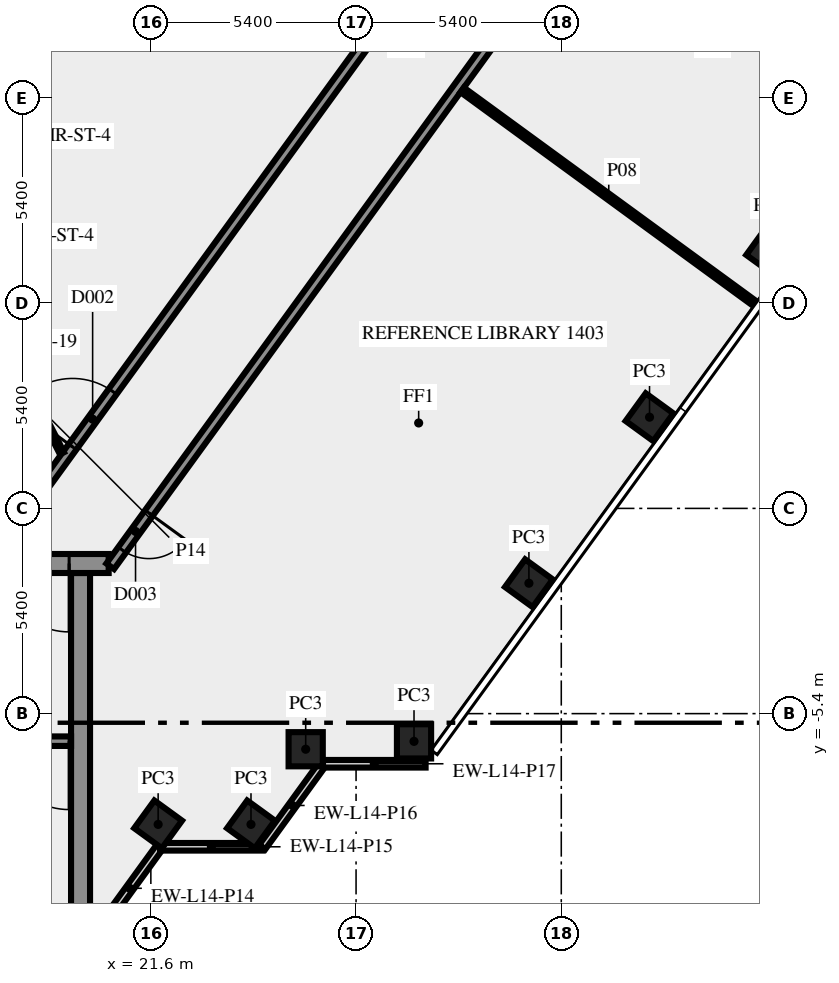
"""IFC4 building model, lengths in metres.
Left out: names, types, materials, properties, quantities, classifications, styles, units other than length and angle.
Written with IfcOpenShell. Run it as: python <this file> out.ifc"""

import sys

from ifc_helpers import new_model, si_unit, direction, frame, frame_2d, origin, origin_2d, place, context, subcontext, project, spatial, rectangle, extrude, element, fill, save


model = new_model("IFC4")
c1 = context("Model", 3, precision=1e-05, world=origin(), true_north=direction((0.0, 1.0)))
c2 = subcontext(c1, "Body", "Model", "MODEL_VIEW")
j1 = project(units=[si_unit("LENGTHUNIT", "METRE"), si_unit("PLANEANGLEUNIT", "RADIAN")], contexts=[c1])
p1 = place(None, origin())
s1 = spatial("IfcSite", under=j1, at=p1, CompositionType="ELEMENT")
p2 = place(p1, origin())
s2 = spatial("IfcBuilding", under=s1, at=p2, CompositionType="ELEMENT")
p3 = place(p2, frame((0.0, 0.0, 63.0)))
s3 = spatial("IfcBuildingStorey", under=s2, at=p3, CompositionType="ELEMENT", Elevation=63.0)
for number, where, z_axis, x_axis in (
    (1, (21.792, -8.315, 0.0), (0.0, 0.0, 1.0), (0.588, 0.809, 0.0)),
    (2, (24.235, -8.315, 0.0), (0.0, 0.0, 1.0), (0.588, 0.809, 0.0)),
    (3, (25.674, -6.337, 0.0), (0.0, 0.0, 1.0), (1.0, 0.0, 0.0)),
    (4, (28.525, -6.13, 0.0), (0.0, 0.0, 1.0), (1.0, 0.0, 0.0)),
    (5, (31.548, -1.969, 0.0), (0.0, 0.0, 1.0), (0.588, 0.809, 0.0)),
    (6, (34.722, 2.4, 0.0), (0.0, 0.0, 1.0), (0.588, 0.809, 0.0)),
    (7, (37.896, 6.769, 0.0), (0.0, 0.0, 1.0), (0.588, 0.809, 0.0)),
):
    element("IfcColumn", number, at=place(p3, frame(where, z_axis=z_axis, x_axis=x_axis)), inside=s3, PredefinedType="COLUMN", context=c2, shape_type="SweptSolid", body=[
        extrude(rectangle(XDim=0.9, YDim=0.9, at=origin_2d()), origin(), (0.0, 0.0, 1.0), 3.65),
    ])
p4 = place(p3, frame((20.253, -11.083, 0.0), z_axis=(0.0, 0.0, 1.0), x_axis=(0.587766567315, 0.809030569476, 0.0)))
e8 = element("IfcWall", 8, at=p4, inside=s3, PredefinedType="SOLIDWALL", context=c2, shape_type="SweptSolid", body=[
    extrude(rectangle(XDim=2.688, YDim=0.2, at=frame_2d((1.344, 0.0))), origin(), (0.0, 0.0, 1.0), 3.65),
])
p5 = place(p3, frame((21.843, -8.904, 0.0), z_axis=(0.0, 0.0, 1.0), x_axis=(1.0, 0.0, 0.0)))
e9 = element("IfcWall", 9, at=p5, inside=s3, PredefinedType="SOLIDWALL", context=c2, shape_type="SweptSolid", body=[
    extrude(rectangle(XDim=2.7, YDim=0.2, at=frame_2d((1.35, 0.0))), origin(), (0.0, 0.0, 1.0), 3.65),
])
p6 = place(p3, frame((24.533, -8.909, 0.0), z_axis=(0.0, 0.0, 1.0), x_axis=(0.587720002413, 0.809064397168, 0.0)))
e10 = element("IfcWall", 10, at=p6, inside=s3, PredefinedType="SOLIDWALL", context=c2, shape_type="SweptSolid", body=[
    extrude(rectangle(XDim=2.7, YDim=0.2, at=frame_2d((1.35, 0.0))), origin(), (0.0, 0.0, 1.0), 3.65),
])
p7 = place(p3, frame((26.13, -6.719, 0.0), z_axis=(0.0, 0.0, 1.0), x_axis=(1.0, 0.0, 0.0)))
e11 = element("IfcWall", 11, at=p7, inside=s3, PredefinedType="SOLIDWALL", context=c2, shape_type="SweptSolid", body=[
    extrude(rectangle(XDim=2.7, YDim=0.2, at=frame_2d((1.35, 0.0))), origin(), (0.0, 0.0, 1.0), 3.65),
])
p8 = place(p3, frame((19.75, -10.5, 0.0), z_axis=(0.0, 0.0, 1.0), x_axis=(0.0, 1.0, 0.0)))
e12 = element("IfcWall", 12, at=p8, inside=s3, PredefinedType="SHEAR", context=c2, shape_type="SweptSolid", body=[
    extrude(rectangle(XDim=8.8, YDim=0.5, at=frame_2d((4.4, 0.0))), origin(), (0.0, 0.0, 1.0), 3.65),
])
p9 = place(p3, frame((19.5, -6.125, 0.0), z_axis=(0.0, 0.0, 1.0), x_axis=(-1.0, 0.0, 0.0)))
e13 = element("IfcWall", 13, at=p9, inside=s3, PredefinedType="SHEAR", context=c2, shape_type="SweptSolid", body=[
    extrude(rectangle(XDim=8.05, YDim=0.25, at=frame_2d((4.025, 0.0))), origin(), (0.0, 0.0, 1.0), 3.65),
])
p10 = place(p9, frame((0.05, 0.0, 0.0)))
e14 = element("IfcOpeningElement", 14, at=p10, cuts=e13, PredefinedType="OPENING", context=c2, shape_type="SweptSolid", body=[
    extrude(rectangle(XDim=1.8, YDim=2.1, at=frame_2d((0.9, 1.05))), frame((0.0, 0.135, 0.0), z_axis=(0.0, -1.0, 0.0), x_axis=(1.0, 0.0, 0.0)), (0.0, 0.0, 1.0), 0.27),
])
p11 = place(p3, frame((20.49, -1.45, 0.0), z_axis=(0.0, 0.0, 1.0), x_axis=(-1.0, 0.0, 0.0)))
e15 = element("IfcWall", 15, at=p11, inside=s3, PredefinedType="SHEAR", context=c2, shape_type="SweptSolid", body=[
    extrude(rectangle(XDim=40.98, YDim=0.5, at=frame_2d((20.49, 0.0))), origin(), (0.0, 0.0, 1.0), 3.65),
])
p12 = place(p11, frame((38.14, 0.0, 0.0)))
e16 = element("IfcOpeningElement", 16, at=p12, cuts=e15, PredefinedType="OPENING", context=c2, shape_type="SweptSolid", body=[
    extrude(rectangle(XDim=1.8, YDim=2.1, at=frame_2d((0.9, 1.05))), frame((0.0, 0.26, 0.0), z_axis=(0.0, -1.0, 0.0), x_axis=(1.0, 0.0, 0.0)), (0.0, 0.0, 1.0), 0.52),
])
p13 = place(p11, frame((35.89, 0.0, 0.0)))
e17 = element("IfcOpeningElement", 17, at=p13, cuts=e15, PredefinedType="OPENING", context=c2, shape_type="SweptSolid", body=[
    extrude(rectangle(XDim=0.9, YDim=2.1, at=frame_2d((0.45, 1.05))), frame((0.0, 0.26, 0.0), z_axis=(0.0, -1.0, 0.0), x_axis=(1.0, 0.0, 0.0)), (0.0, 0.0, 1.0), 0.52),
])
p14 = place(p11, frame((32.94, 0.0, 0.0)))
e18 = element("IfcOpeningElement", 18, at=p14, cuts=e15, PredefinedType="OPENING", context=c2, shape_type="SweptSolid", body=[
    extrude(rectangle(XDim=0.9, YDim=2.1, at=frame_2d((0.45, 1.05))), frame((0.0, 0.26, 0.0), z_axis=(0.0, -1.0, 0.0), x_axis=(1.0, 0.0, 0.0)), (0.0, 0.0, 1.0), 0.52),
])
p15 = place(p11, frame((19.59, 0.0, 0.0)))
e19 = element("IfcOpeningElement", 19, at=p15, cuts=e15, PredefinedType="OPENING", context=c2, shape_type="SweptSolid", body=[
    extrude(rectangle(XDim=2.0, YDim=2.1, at=frame_2d((1.0, 1.05))), frame((0.0, 0.26, 0.0), z_axis=(0.0, -1.0, 0.0), x_axis=(1.0, 0.0, 0.0)), (0.0, 0.0, 1.0), 0.52),
])
p16 = place(p11, frame((7.14, 0.0, 0.0)))
e20 = element("IfcOpeningElement", 20, at=p16, cuts=e15, PredefinedType="OPENING", context=c2, shape_type="SweptSolid", body=[
    extrude(rectangle(XDim=0.9, YDim=2.1, at=frame_2d((0.45, 1.05))), frame((0.0, 0.26, 0.0), z_axis=(0.0, -1.0, 0.0), x_axis=(1.0, 0.0, 0.0)), (0.0, 0.0, 1.0), 0.52),
])
p17 = place(p11, frame((5.028, 0.0, 0.0)))
e21 = element("IfcOpeningElement", 21, at=p17, cuts=e15, PredefinedType="OPENING", context=c2, shape_type="SweptSolid", body=[
    extrude(rectangle(XDim=0.8, YDim=2.1, at=frame_2d((0.4, 1.05))), frame((0.0, 0.26, 0.0), z_axis=(0.0, -1.0, 0.0), x_axis=(1.0, 0.0, 0.0)), (0.0, 0.0, 1.0), 0.52),
])
p18 = place(p11, frame((3.452, 0.0, 0.0)))
e22 = element("IfcOpeningElement", 22, at=p18, cuts=e15, PredefinedType="OPENING", context=c2, shape_type="SweptSolid", body=[
    extrude(rectangle(XDim=0.8, YDim=2.1, at=frame_2d((0.4, 1.05))), frame((0.0, 0.26, 0.0), z_axis=(0.0, -1.0, 0.0), x_axis=(1.0, 0.0, 0.0)), (0.0, 0.0, 1.0), 0.52),
])
p19 = place(p11, frame((1.04, 0.0, 0.0)))
e23 = element("IfcOpeningElement", 23, at=p19, cuts=e15, PredefinedType="OPENING", context=c2, shape_type="SweptSolid", body=[
    extrude(rectangle(XDim=1.8, YDim=2.1, at=frame_2d((0.9, 1.05))), frame((0.0, 0.26, 0.0), z_axis=(0.0, -1.0, 0.0), x_axis=(1.0, 0.0, 0.0)), (0.0, 0.0, 1.0), 0.52),
])
p20 = place(p3, frame((17.545, -1.125, 0.0), z_axis=(0.0, 0.0, 1.0), x_axis=(0.587786323093, 0.809016216391, 0.0)))
e24 = element("IfcWall", 24, at=p20, inside=s3, PredefinedType="SOLIDWALL", context=c2, shape_type="SweptSolid", body=[
    extrude(rectangle(XDim=33.493, YDim=0.25, at=frame_2d((16.747, 0.0))), origin(), (0.0, 0.0, 1.0), 3.65),
])
p21 = place(p20, frame((31.403, 0.0, 0.0)))
e25 = element("IfcOpeningElement", 25, at=p21, cuts=e24, PredefinedType="OPENING", context=c2, shape_type="SweptSolid", body=[
    extrude(rectangle(XDim=1.8, YDim=2.1, at=frame_2d((0.9, 1.05))), frame((0.0, 0.135, 0.0), z_axis=(0.0, -1.0, 0.0), x_axis=(1.0, 0.0, 0.0)), (0.0, 0.0, 1.0), 0.27),
])
p22 = place(p20, frame((3.392, 0.0, 0.0)))
e26 = element("IfcOpeningElement", 26, at=p22, cuts=e24, PredefinedType="OPENING", context=c2, shape_type="SweptSolid", body=[
    extrude(rectangle(XDim=1.8, YDim=2.1, at=frame_2d((0.9, 1.05))), frame((0.0, 0.135, 0.0), z_axis=(0.0, -1.0, 0.0), x_axis=(1.0, 0.0, 0.0)), (0.0, 0.0, 1.0), 0.27),
])
p23 = place(p3, frame((43.467, 30.045, 0.0), z_axis=(0.0, 0.0, 1.0), x_axis=(-0.587784726077, -0.809017376692, 0.0)))
e27 = element("IfcWall", 27, at=p23, inside=s3, PredefinedType="SOLIDWALL", context=c2, shape_type="SweptSolid", body=[
    extrude(rectangle(XDim=39.02, YDim=0.25, at=frame_2d((19.51, 0.0))), origin(), (0.0, 0.0, 1.0), 3.65),
])
p24 = place(p23, frame((11.404, 0.0, 0.0)))
e28 = element("IfcOpeningElement", 28, at=p24, cuts=e27, PredefinedType="OPENING", context=c2, shape_type="SweptSolid", body=[
    extrude(rectangle(XDim=0.9, YDim=2.1, at=frame_2d((0.45, 1.05))), frame((0.0, 0.135, 0.0), z_axis=(0.0, -1.0, 0.0), x_axis=(1.0, 0.0, 0.0)), (0.0, 0.0, 1.0), 0.27),
])
p25 = place(p23, frame((13.004, 0.0, 0.0)))
e29 = element("IfcOpeningElement", 29, at=p25, cuts=e27, PredefinedType="OPENING", context=c2, shape_type="SweptSolid", body=[
    extrude(rectangle(XDim=1.0, YDim=2.1, at=frame_2d((0.5, 1.05))), frame((0.0, 0.135, 0.0), z_axis=(0.0, -1.0, 0.0), x_axis=(1.0, 0.0, 0.0)), (0.0, 0.0, 1.0), 0.27),
])
p26 = place(p23, frame((37.287, 0.0, 0.0)))
e30 = element("IfcOpeningElement", 30, at=p26, cuts=e27, PredefinedType="OPENING", context=c2, shape_type="SweptSolid", body=[
    extrude(rectangle(XDim=1.2, YDim=2.1, at=frame_2d((0.6, 1.05))), frame((0.0, 0.135, 0.0), z_axis=(0.0, -1.0, 0.0), x_axis=(1.0, 0.0, 0.0)), (0.0, 0.0, 1.0), 0.27),
])
p27 = place(p23, frame((0.224, 0.0, 0.0)))
e31 = element("IfcOpeningElement", 31, at=p27, cuts=e27, PredefinedType="OPENING", context=c2, shape_type="SweptSolid", body=[
    extrude(rectangle(XDim=0.9, YDim=2.1, at=frame_2d((0.45, 1.05))), frame((0.0, 0.135, 0.0), z_axis=(0.0, -1.0, 0.0), x_axis=(1.0, 0.0, 0.0)), (0.0, 0.0, 1.0), 0.27),
])
p28 = place(p3, frame((29.793, 11.012, 0.0), z_axis=(0.0, 0.0, 1.0), x_axis=(0.807645841498, -0.589667868135, 0.0)))
e32 = element("IfcWall", 32, at=p28, inside=s3, PredefinedType="PARTITIONING", context=c2, shape_type="SweptSolid", body=[
    extrude(rectangle(XDim=9.551, YDim=0.15, at=frame_2d((4.775, 0.0))), origin(), (0.0, 0.0, 1.0), 2.75),
])
p29 = place(p3, frame((18.0, 3.925, 0.0), z_axis=(0.0, 0.0, 1.0), x_axis=(0.453950796792, -0.891026752736, 0.0)))
e33 = element("IfcWall", 33, at=p29, inside=s3, PredefinedType="PARTITIONING", context=c2, shape_type="SweptSolid", body=[
    extrude(rectangle(XDim=2.778, YDim=0.12, at=frame_2d((1.389, 0.0))), origin(), (0.0, 0.0, 1.0), 3.65),
])
p30 = place(p10, origin())
e34 = element("IfcDoor", 34, at=p30, inside=s3, OperationType="DOUBLE_DOOR_SINGLE_SWING", PredefinedType="DOOR", context=c2, shape_type="SweptSolid", body=[
    extrude(rectangle(XDim=1.8, YDim=2.1, at=frame_2d((0.9, 1.05))), frame((0.0, 0.025, 0.0), z_axis=(0.0, -1.0, 0.0), x_axis=(1.0, 0.0, 0.0)), (0.0, 0.0, 1.0), 0.05),
])
fill(e14, e34)
p31 = place(p19, origin())
e35 = element("IfcDoor", 35, at=p31, inside=s3, OperationType="DOUBLE_DOOR_SINGLE_SWING", PredefinedType="DOOR", context=c2, shape_type="SweptSolid", body=[
    extrude(rectangle(XDim=1.8, YDim=2.1, at=frame_2d((0.9, 1.05))), frame((0.0, 0.025, 0.0), z_axis=(0.0, -1.0, 0.0), x_axis=(1.0, 0.0, 0.0)), (0.0, 0.0, 1.0), 0.05),
])
fill(e23, e35)
p32 = place(p22, origin())
e36 = element("IfcDoor", 36, at=p32, inside=s3, OperationType="DOUBLE_DOOR_SINGLE_SWING", PredefinedType="DOOR", context=c2, shape_type="SweptSolid", body=[
    extrude(rectangle(XDim=1.8, YDim=2.1, at=frame_2d((0.9, 1.05))), frame((0.0, 0.025, 0.0), z_axis=(0.0, -1.0, 0.0), x_axis=(1.0, 0.0, 0.0)), (0.0, 0.0, 1.0), 0.05),
])
fill(e26, e36)
p33 = place(p26, origin())
e37 = element("IfcDoor", 37, at=p33, inside=s3, OperationType="SINGLE_SWING_RIGHT", PredefinedType="DOOR", context=c2, shape_type="SweptSolid", body=[
    extrude(rectangle(XDim=1.2, YDim=2.1, at=frame_2d((0.6, 1.05))), frame((0.0, 0.025, 0.0), z_axis=(0.0, -1.0, 0.0), x_axis=(1.0, 0.0, 0.0)), (0.0, 0.0, 1.0), 0.05),
])
fill(e30, e37)
save(model, sys.argv[1])
